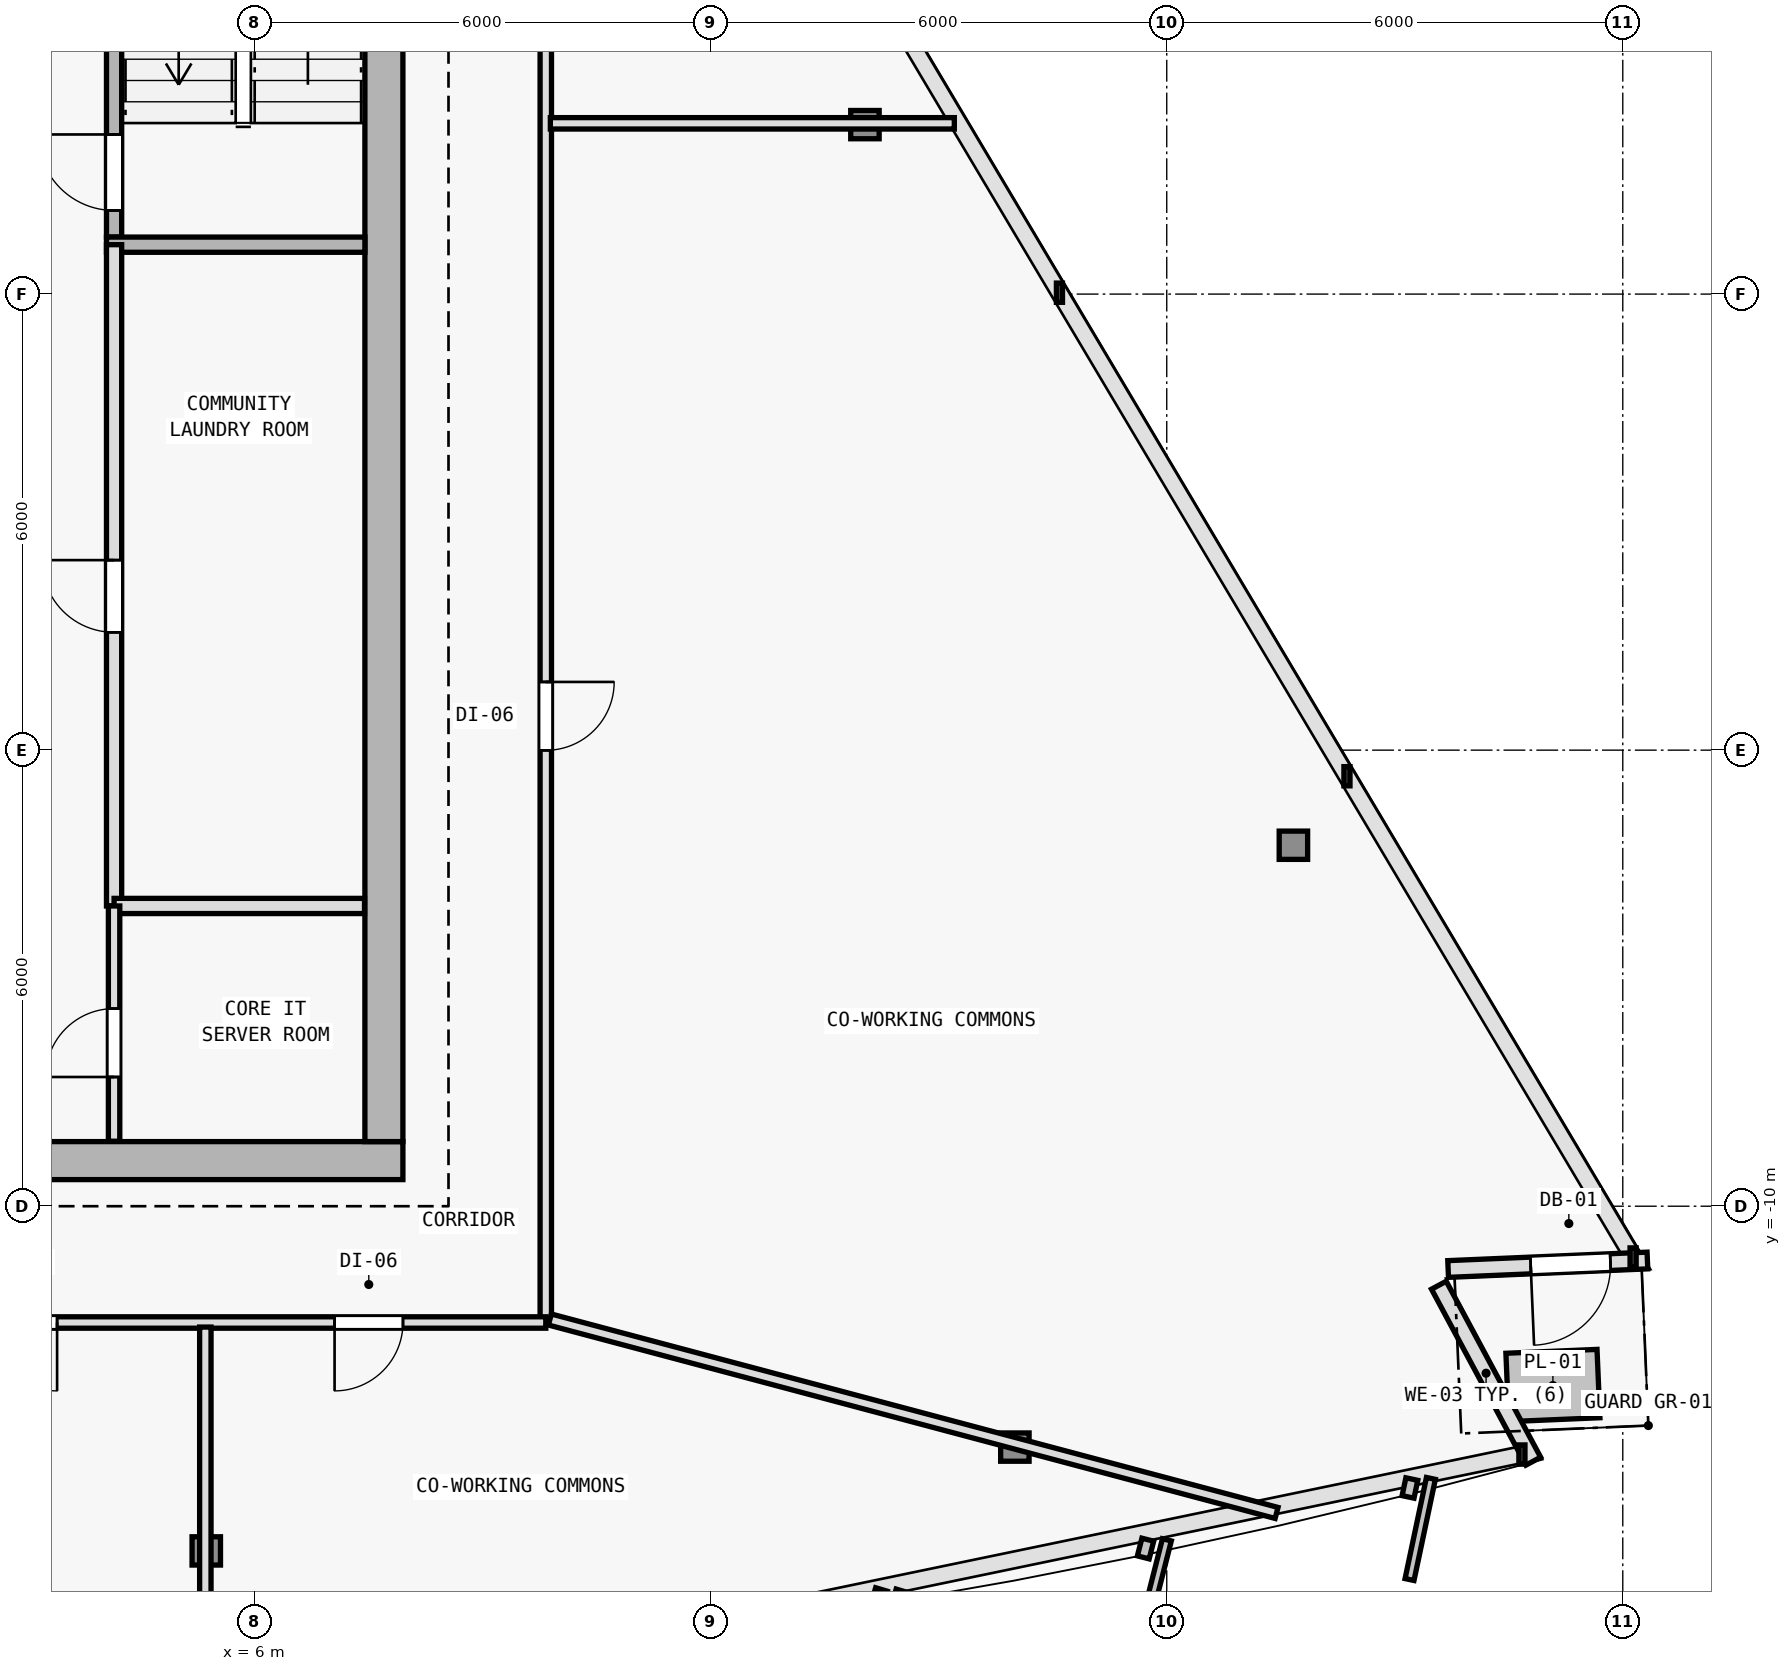
"""IFC4 building model, lengths in metres.
Left out: names, types, materials, properties, quantities, classifications, styles, units other than length and angle.
Written with IfcOpenShell. Run it as: python <this file> out.ifc"""

import sys

from ifc_helpers import new_model, si_unit, direction, frame, frame_2d, origin, origin_2d, place, context, subcontext, project, spatial, rectangle, i_section, extrude, element, fill, save


model = new_model("IFC4")
c1 = context("Model", 3, precision=1e-05, world=origin(), true_north=direction((0.0, 1.0)))
c2 = subcontext(c1, "Body", "Model", "MODEL_VIEW")
j1 = project(units=[si_unit("LENGTHUNIT", "METRE"), si_unit("PLANEANGLEUNIT", "RADIAN")], contexts=[c1])
p1 = place(None, origin())
s1 = spatial("IfcSite", under=j1, at=p1, CompositionType="ELEMENT")
p2 = place(p1, origin())
s2 = spatial("IfcBuilding", under=s1, at=p2, CompositionType="ELEMENT")
p3 = place(p2, frame((0.0, 0.0, 246.3)))
s3 = spatial("IfcBuildingStorey", under=s2, at=p3, CompositionType="ELEMENT", Elevation=246.3)
for number, where, z_axis, x_axis in (
    (1, (7.7, -9.4, 0.0), (0.0, 0.0, 1.0), (1.0, 0.0, 0.0)),
    (2, (7.7, 0.4, 0.0), (0.0, 0.0, 1.0), (1.0, 0.0, 0.0)),
):
    element("IfcColumn", number, at=place(p3, frame(where, z_axis=z_axis, x_axis=x_axis)), inside=s3, PredefinedType="COLUMN", context=c2, shape_type="SweptSolid", body=[
        extrude(i_section(OverallWidth=0.398, OverallDepth=0.387, WebThickness=0.013, FlangeThickness=0.022, FilletRadius=0.015, at=origin_2d()), origin(), (0.0, 0.0, 1.0), 4.5),
    ])
p4 = place(p3, frame((5.363, -14.535, 0.005), z_axis=(-0.005545112284, 0.028160472186, 0.99958803491), x_axis=(-0.981159154887, -0.193201223549, 0.0)))
e3 = element("IfcColumn", 3, at=p4, inside=s3, PredefinedType="COLUMN", context=c2, shape_type="SweptSolid", body=[
    extrude(i_section(OverallWidth=0.374, OverallDepth=0.372, WebThickness=0.012, FlangeThickness=0.02, FilletRadius=0.015, at=origin_2d()), origin(), (0.0, 0.0, 1.0), 4.491),
])
p5 = place(p3, frame((16.002, -13.169, 0.005), z_axis=(-0.016525223725, 0.026799129265, 0.999504238936), x_axis=(-0.851183725565, -0.524867855115, 0.0)))
e4 = element("IfcColumn", 4, at=p5, inside=s3, PredefinedType="COLUMN", context=c2, shape_type="SweptSolid", body=[
    extrude(i_section(OverallWidth=0.374, OverallDepth=0.372, WebThickness=0.012, FlangeThickness=0.02, FilletRadius=0.015, at=origin_2d()), origin(), (0.0, 0.0, 1.0), 4.491),
])
p6 = place(p3, frame((19.667, -5.251, 0.005), z_axis=(-0.020876646911, 0.017288473223, 0.999632569651), x_axis=(-0.637813971185, -0.770190455771, 0.0)))
e5 = element("IfcColumn", 5, at=p6, inside=s3, PredefinedType="COLUMN", context=c2, shape_type="SweptSolid", body=[
    extrude(i_section(OverallWidth=0.374, OverallDepth=0.372, WebThickness=0.012, FlangeThickness=0.02, FilletRadius=0.015, at=origin_2d()), origin(), (0.0, 0.0, 1.0), 4.491),
])
p7 = place(p3, frame((14.029, 4.229, 0.005), z_axis=(-0.015117211909, 0.007612984415, 0.999856745925), x_axis=(-0.449781931574, -0.893138406984, 0.0)))
e6 = element("IfcColumn", 6, at=p7, inside=s3, PredefinedType="COLUMN", context=c2, shape_type="SweptSolid", body=[
    extrude(i_section(OverallWidth=0.374, OverallDepth=0.372, WebThickness=0.012, FlangeThickness=0.02, FilletRadius=0.015, at=origin_2d()), origin(), (0.0, 0.0, 1.0), 4.49),
])
p8 = place(p3, frame((21.581, -11.04, 0.0), z_axis=(0.0, 0.0, 1.0), x_axis=(0.472791303324, -0.881174434208, 0.0)))
e7 = element("IfcWall", 7, at=p8, inside=s3, PredefinedType="SOLIDWALL", context=c2, shape_type="SweptSolid", body=[
    extrude(rectangle(XDim=2.627, YDim=0.22, at=frame_2d((1.313, 0.0))), origin(), (0.0, 0.0, 1.0), 4.25),
])
p9 = place(p3, frame((24.324, -10.714, 0.0), z_axis=(0.0, 0.0, 1.0), x_axis=(-0.999095924753, -0.042512740932, 0.0)))
e8 = element("IfcWall", 8, at=p9, inside=s3, PredefinedType="SOLIDWALL", context=c2, shape_type="SweptSolid", body=[
    extrude(rectangle(XDim=2.625, YDim=0.22, at=frame_2d((1.312, 0.0))), origin(), (0.0, 0.0, 1.0), 4.25),
])
p10 = place(p9, frame((0.487, 0.0, 0.0)))
e9 = element("IfcOpeningElement", 9, at=p10, cuts=e8, PredefinedType="OPENING", context=c2, shape_type="SweptSolid", body=[
    extrude(rectangle(XDim=1.05, YDim=2.15, at=frame_2d((0.525, 1.075))), frame((0.0, 0.12, 0.0), z_axis=(0.0, -1.0, 0.0), x_axis=(1.0, 0.0, 0.0)), (0.0, 0.0, 1.0), 0.24),
])
p11 = place(p3, frame((-7.95, -9.4, 0.0), z_axis=(0.0, 0.0, 1.0), x_axis=(1.0, 0.0, 0.0)))
e10 = element("IfcWall", 10, at=p11, inside=s3, PredefinedType="SHEAR", context=c2, shape_type="SweptSolid", body=[
    extrude(rectangle(XDim=15.9, YDim=0.5, at=frame_2d((7.95, 0.0))), origin(), (0.0, 0.0, 1.0), 4.25),
])
p12 = place(p11, frame((9.6, 0.0, 0.0)))
e11 = element("IfcOpeningElement", 11, at=p12, cuts=e10, PredefinedType="OPENING", context=c2, shape_type="SweptSolid", body=[
    extrude(rectangle(XDim=1.5, YDim=2.2, at=frame_2d((0.75, 1.1))), frame((0.0, 0.26, 0.0), z_axis=(0.0, -1.0, 0.0), x_axis=(1.0, 0.0, 0.0)), (0.0, 0.0, 1.0), 0.52),
])
p13 = place(p3, frame((7.7, 9.95, 0.0), z_axis=(0.0, 0.0, 1.0), x_axis=(0.0, -1.0, 0.0)))
e12 = element("IfcWall", 12, at=p13, inside=s3, PredefinedType="SHEAR", context=c2, shape_type="SweptSolid", body=[
    extrude(rectangle(XDim=19.1, YDim=0.5, at=frame_2d((9.55, 0.0))), origin(), (0.0, 0.0, 1.0), 4.25),
])
p14 = place(p3, frame((4.15, 2.75, 0.0), z_axis=(0.0, 0.0, 1.0), x_axis=(0.0, 1.0, 0.0)))
e13 = element("IfcWall", 13, at=p14, inside=s3, PredefinedType="SOLIDWALL", context=c2, shape_type="SweptSolid", body=[
    extrude(rectangle(XDim=7.2, YDim=0.2, at=frame_2d((3.6, 0.0))), origin(), (0.0, 0.0, 1.0), 4.25),
])
p15 = place(p14, frame((0.35, 0.0, 0.0)))
e14 = element("IfcOpeningElement", 14, at=p15, cuts=e13, PredefinedType="OPENING", context=c2, shape_type="SweptSolid", body=[
    extrude(rectangle(XDim=1.0, YDim=2.15, at=frame_2d((0.5, 1.075))), frame((0.0, 0.11, 0.0), z_axis=(0.0, -1.0, 0.0), x_axis=(1.0, 0.0, 0.0)), (0.0, 0.0, 1.0), 0.22),
])
p16 = place(p3, frame((4.05, 2.65, 0.0), z_axis=(0.0, 0.0, 1.0), x_axis=(1.0, 0.0, 0.0)))
e15 = element("IfcWall", 15, at=p16, inside=s3, PredefinedType="SOLIDWALL", context=c2, shape_type="SweptSolid", body=[
    extrude(rectangle(XDim=3.4, YDim=0.2, at=frame_2d((1.7, 0.0))), origin(), (0.0, 0.0, 1.0), 4.25),
])
p17 = place(p3, frame((4.15, -6.05, 0.0), z_axis=(0.0, 0.0, 1.0), x_axis=(0.0, 1.0, 0.0)))
e16 = element("IfcWall", 16, at=p17, inside=s3, PredefinedType="SOLIDWALL", context=c2, shape_type="SweptSolid", body=[
    extrude(rectangle(XDim=8.7, YDim=0.2, at=frame_2d((4.35, 0.0))), origin(), (0.0, 0.0, 1.0), 4.25),
])
p18 = place(p17, frame((3.6, 0.0, 0.0)))
e17 = element("IfcOpeningElement", 17, at=p18, cuts=e16, PredefinedType="OPENING", context=c2, shape_type="SweptSolid", body=[
    extrude(rectangle(XDim=0.95, YDim=2.1, at=frame_2d((0.475, 1.05))), frame((0.0, 0.11, 0.0), z_axis=(0.0, -1.0, 0.0), x_axis=(1.0, 0.0, 0.0)), (0.0, 0.0, 1.0), 0.22),
])
p19 = place(p3, frame((4.15, -6.05, 0.0), z_axis=(0.0, 0.0, 1.0), x_axis=(1.0, 0.0, 0.0)))
e18 = element("IfcWall", 18, at=p19, inside=s3, PredefinedType="SOLIDWALL", context=c2, shape_type="SweptSolid", body=[
    extrude(rectangle(XDim=3.295, YDim=0.2, at=frame_2d((1.647, 0.0))), origin(), (0.0, 0.0, 1.0), 4.25),
])
p20 = place(p3, frame((4.15, -9.145, 0.0), z_axis=(0.0, 0.0, 1.0), x_axis=(0.0, 1.0, 0.0)))
e19 = element("IfcWall", 19, at=p20, inside=s3, PredefinedType="PARTITIONING", context=c2, shape_type="SweptSolid", body=[
    extrude(rectangle(XDim=3.095, YDim=0.15, at=frame_2d((1.547, 0.0))), origin(), (0.0, 0.0, 1.0), 4.25),
])
p21 = place(p20, frame((0.845, 0.0, 0.0)))
e20 = element("IfcOpeningElement", 20, at=p21, cuts=e19, PredefinedType="OPENING", context=c2, shape_type="SweptSolid", body=[
    extrude(rectangle(XDim=0.9, YDim=2.1, at=frame_2d((0.45, 1.05))), frame((0.0, 0.085, 0.0), z_axis=(0.0, -1.0, 0.0), x_axis=(1.0, 0.0, 0.0)), (0.0, 0.0, 1.0), 0.17),
])
p22 = place(p3, frame((9.83, 8.426, 0.0), z_axis=(0.0, 0.0, 1.0), x_axis=(0.0, -1.0, 0.0)))
e21 = element("IfcWall", 21, at=p22, inside=s3, PredefinedType="PARTITIONING", context=c2, shape_type="SweptSolid", body=[
    extrude(rectangle(XDim=19.956, YDim=0.15, at=frame_2d((9.978, 0.0))), origin(), (0.0, 0.0, 1.0), 3.625),
])
p23 = place(p22, frame((11.528, 0.0, 0.0)))
e22 = element("IfcOpeningElement", 22, at=p23, cuts=e21, PredefinedType="OPENING", context=c2, shape_type="SweptSolid", body=[
    extrude(rectangle(XDim=0.9, YDim=2.1, at=frame_2d((0.45, 1.05))), frame((0.0, 0.085, 0.0), z_axis=(0.0, -1.0, 0.0), x_axis=(1.0, 0.0, 0.0)), (0.0, 0.0, 1.0), 0.17),
])
p24 = place(p22, frame((1.729, 0.0, 0.0)))
e23 = element("IfcOpeningElement", 23, at=p24, cuts=e21, PredefinedType="OPENING", context=c2, shape_type="SweptSolid", body=[
    extrude(rectangle(XDim=0.9, YDim=2.1, at=frame_2d((0.45, 1.05))), frame((0.0, 0.085, 0.0), z_axis=(0.0, -1.0, 0.0), x_axis=(1.0, 0.0, 0.0)), (0.0, 0.0, 1.0), 0.17),
])
p25 = place(p3, frame((9.83, -11.53, 0.0), z_axis=(0.0, 0.0, 1.0), x_axis=(-1.0, 0.0, 0.0)))
e24 = element("IfcWall", 24, at=p25, inside=s3, PredefinedType="PARTITIONING", context=c2, shape_type="SweptSolid", body=[
    extrude(rectangle(XDim=19.66, YDim=0.15, at=frame_2d((9.83, 0.0))), origin(), (0.0, 0.0, 1.0), 3.905),
])
p26 = place(p25, frame((16.881, 0.0, 0.0)))
e25 = element("IfcOpeningElement", 25, at=p26, cuts=e24, PredefinedType="OPENING", context=c2, shape_type="SweptSolid", body=[
    extrude(rectangle(XDim=0.9, YDim=2.1, at=frame_2d((0.45, 1.05))), frame((0.0, 0.085, 0.0), z_axis=(0.0, -1.0, 0.0), x_axis=(1.0, 0.0, 0.0)), (0.0, 0.0, 1.0), 0.17),
])
p27 = place(p25, frame((11.78, 0.0, 0.0)))
e26 = element("IfcOpeningElement", 26, at=p27, cuts=e24, PredefinedType="OPENING", context=c2, shape_type="SweptSolid", body=[
    extrude(rectangle(XDim=0.9, YDim=2.1, at=frame_2d((0.45, 1.05))), frame((0.0, 0.085, 0.0), z_axis=(0.0, -1.0, 0.0), x_axis=(1.0, 0.0, 0.0)), (0.0, 0.0, 1.0), 0.17),
])
p28 = place(p25, frame((6.43, 0.0, 0.0)))
e27 = element("IfcOpeningElement", 27, at=p28, cuts=e24, PredefinedType="OPENING", context=c2, shape_type="SweptSolid", body=[
    extrude(rectangle(XDim=0.9, YDim=2.1, at=frame_2d((0.45, 1.05))), frame((0.0, 0.085, 0.0), z_axis=(0.0, -1.0, 0.0), x_axis=(1.0, 0.0, 0.0)), (0.0, 0.0, 1.0), 0.17),
])
p29 = place(p25, frame((1.879, 0.0, 0.0)))
e28 = element("IfcOpeningElement", 28, at=p29, cuts=e24, PredefinedType="OPENING", context=c2, shape_type="SweptSolid", body=[
    extrude(rectangle(XDim=0.9, YDim=2.1, at=frame_2d((0.45, 1.05))), frame((0.0, 0.085, 0.0), z_axis=(0.0, -1.0, 0.0), x_axis=(1.0, 0.0, 0.0)), (0.0, 0.0, 1.0), 0.17),
])
p30 = place(p3, frame((5.351, -11.59, 0.0), z_axis=(0.0, 0.0, 1.0), x_axis=(0.0, -1.0, 0.0)))
e29 = element("IfcWall", 29, at=p30, inside=s3, PredefinedType="PARTITIONING", context=c2, shape_type="SweptSolid", body=[
    extrude(rectangle(XDim=4.479, YDim=0.15, at=frame_2d((2.239, 0.0))), origin(), (0.0, 0.0, 1.0), 3.875),
])
p31 = place(p3, frame((9.884, -11.49, 0.0), z_axis=(0.0, 0.0, 1.0), x_axis=(0.96635442317, -0.257214169168, 0.0)))
e30 = element("IfcWall", 30, at=p31, inside=s3, PredefinedType="PARTITIONING", context=c2, shape_type="SweptSolid", body=[
    extrude(rectangle(XDim=9.894, YDim=0.15, at=frame_2d((4.947, 0.0))), origin(), (0.0, 0.0, 1.0), 3.875),
])
p32 = place(p3, frame((9.89, 4.247, 0.0), z_axis=(0.0, 0.0, 1.0), x_axis=(1.0, 0.0, 0.0)))
e31 = element("IfcWall", 31, at=p32, inside=s3, PredefinedType="PARTITIONING", context=c2, shape_type="SweptSolid", body=[
    extrude(rectangle(XDim=5.315, YDim=0.15, at=frame_2d((2.658, 0.0))), origin(), (0.0, 0.0, 1.0), 3.625),
])
p33 = place(p10, origin())
e32 = element("IfcDoor", 32, at=p33, inside=s3, OperationType="SINGLE_SWING_RIGHT", PredefinedType="DOOR", context=c2, shape_type="SweptSolid", body=[
    extrude(rectangle(XDim=1.05, YDim=2.15, at=frame_2d((0.525, 1.075))), frame((0.0, 0.025, 0.0), z_axis=(0.0, -1.0, 0.0), x_axis=(1.0, 0.0, 0.0)), (0.0, 0.0, 1.0), 0.05),
])
fill(e9, e32)
p34 = place(p15, origin())
e33 = element("IfcDoor", 33, at=p34, inside=s3, OperationType="SINGLE_SWING_RIGHT", PredefinedType="DOOR", context=c2, shape_type="SweptSolid", body=[
    extrude(rectangle(XDim=1.0, YDim=2.15, at=frame_2d((0.5, 1.075))), frame((0.0, 0.025, 0.0), z_axis=(0.0, -1.0, 0.0), x_axis=(1.0, 0.0, 0.0)), (0.0, 0.0, 1.0), 0.05),
])
fill(e14, e33)
p35 = place(p18, origin())
e34 = element("IfcDoor", 34, at=p35, inside=s3, OperationType="SINGLE_SWING_RIGHT", PredefinedType="DOOR", context=c2, shape_type="SweptSolid", body=[
    extrude(rectangle(XDim=0.95, YDim=2.1, at=frame_2d((0.475, 1.05))), frame((0.0, 0.025, 0.0), z_axis=(0.0, -1.0, 0.0), x_axis=(1.0, 0.0, 0.0)), (0.0, 0.0, 1.0), 0.05),
])
fill(e17, e34)
p36 = place(p21, origin())
e35 = element("IfcDoor", 35, at=p36, inside=s3, OperationType="SINGLE_SWING_LEFT", PredefinedType="DOOR", context=c2, shape_type="SweptSolid", body=[
    extrude(rectangle(XDim=0.9, YDim=2.1, at=frame_2d((0.45, 1.05))), frame((0.0, 0.025, 0.0), z_axis=(0.0, -1.0, 0.0), x_axis=(1.0, 0.0, 0.0)), (0.0, 0.0, 1.0), 0.05),
])
fill(e20, e35)
p37 = place(p28, origin())
e36 = element("IfcDoor", 36, at=p37, inside=s3, OperationType="SINGLE_SWING_LEFT", PredefinedType="DOOR", context=c2, shape_type="SweptSolid", body=[
    extrude(rectangle(XDim=0.9, YDim=2.1, at=frame_2d((0.45, 1.05))), frame((0.0, 0.025, 0.0), z_axis=(0.0, -1.0, 0.0), x_axis=(1.0, 0.0, 0.0)), (0.0, 0.0, 1.0), 0.05),
])
fill(e27, e36)
p38 = place(p29, origin())
e37 = element("IfcDoor", 37, at=p38, inside=s3, OperationType="SINGLE_SWING_RIGHT", PredefinedType="DOOR", context=c2, shape_type="SweptSolid", body=[
    extrude(rectangle(XDim=0.9, YDim=2.1, at=frame_2d((0.45, 1.05))), frame((0.0, 0.025, 0.0), z_axis=(0.0, -1.0, 0.0), x_axis=(1.0, 0.0, 0.0)), (0.0, 0.0, 1.0), 0.05),
])
fill(e28, e37)
p39 = place(p23, origin())
e38 = element("IfcDoor", 38, at=p39, inside=s3, OperationType="SINGLE_SWING_LEFT", PredefinedType="DOOR", context=c2, shape_type="SweptSolid", body=[
    extrude(rectangle(XDim=0.9, YDim=2.1, at=frame_2d((0.45, 1.05))), frame((0.0, 0.025, 0.0), z_axis=(0.0, -1.0, 0.0), x_axis=(1.0, 0.0, 0.0)), (0.0, 0.0, 1.0), 0.05),
])
fill(e22, e38)
save(model, sys.argv[1])
